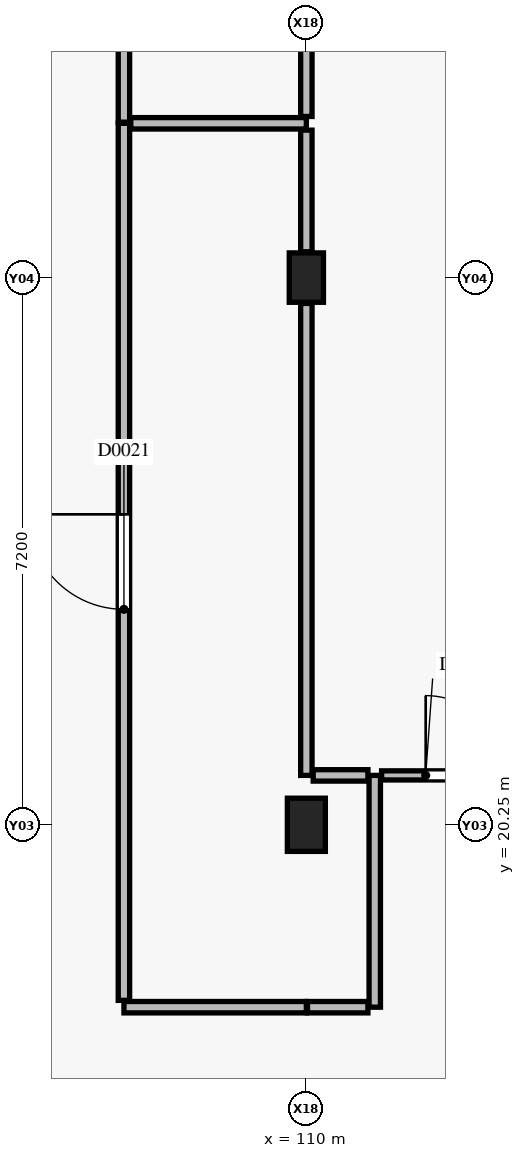
"""IFC4 building model, lengths in metres.
Left out: names, types, materials, properties, quantities, classifications, styles, units other than length and angle.
Written with IfcOpenShell. Run it as: python <this file> out.ifc"""

import sys

from ifc_helpers import new_model, si_unit, direction, frame, frame_2d, origin, origin_2d, place, context, subcontext, project, spatial, rectangle, extrude, element, fill, save


model = new_model("IFC4")
c1 = context("Model", 3, precision=1e-05, world=origin(), true_north=direction((0.0, 1.0)))
c2 = subcontext(c1, "Body", "Model", "MODEL_VIEW")
j1 = project(units=[si_unit("LENGTHUNIT", "METRE"), si_unit("PLANEANGLEUNIT", "RADIAN")], contexts=[c1])
p1 = place(None, origin())
s1 = spatial("IfcSite", under=j1, at=p1, CompositionType="ELEMENT")
p2 = place(p1, origin())
s2 = spatial("IfcBuilding", under=s1, at=p2, CompositionType="ELEMENT")
p3 = place(p2, origin())
s3 = spatial("IfcBuildingStorey", under=s2, at=p3, CompositionType="ELEMENT", Elevation=0.0)
p4 = place(p3, frame((110.0, 20.25, 0.0), z_axis=(0.0, 0.0, 1.0), x_axis=(1.0, 0.0, 0.0)))
e1 = element("IfcColumn", 1, at=p4, inside=s3, PredefinedType="COLUMN", context=c2, shape_type="SweptSolid", body=[
    extrude(rectangle(XDim=0.5, YDim=0.7, at=origin_2d()), origin(), (0.0, 0.0, 1.0), 4.8),
])
p5 = place(p3, frame((110.0, 27.45, 0.0), z_axis=(0.0, 0.0, 1.0), x_axis=(1.0, 0.0, 0.0)))
e2 = element("IfcColumn", 2, at=p5, inside=s3, PredefinedType="COLUMN", context=c2, shape_type="SweptSolid", body=[
    extrude(rectangle(XDim=0.45, YDim=0.65, at=origin_2d()), origin(), (0.0, 0.0, 1.0), 4.8),
])
p6 = place(p3, frame((107.6, 17.85, 0.0), z_axis=(0.0, 0.0, 1.0), x_axis=(1.0, 0.0, 0.0)))
e3 = element("IfcWall", 3, at=p6, inside=s3, PredefinedType="PARTITIONING", context=c2, shape_type="SweptSolid", body=[
    extrude(rectangle(XDim=2.4, YDim=0.15, at=frame_2d((1.2, 0.0))), origin(), (0.0, 0.0, 1.0), 3.955),
])
p7 = place(p3, frame((107.6, 17.94, 0.0), z_axis=(0.0, 0.0, 1.0), x_axis=(0.0, 1.0, 0.0)))
e4 = element("IfcWall", 4, at=p7, inside=s3, PredefinedType="PARTITIONING", context=c2, shape_type="SweptSolid", body=[
    extrude(rectangle(XDim=11.54, YDim=0.15, at=frame_2d((5.77, 0.0))), origin(), (0.0, 0.0, 1.0), 3.955),
])
p8 = place(p7, frame((5.145, 0.0, 0.0)))
e5 = element("IfcOpeningElement", 5, at=p8, cuts=e4, PredefinedType="OPENING", context=c2, shape_type="SweptSolid", body=[
    extrude(rectangle(XDim=1.25, YDim=2.15, at=frame_2d((0.625, 1.075))), frame((0.0, 0.085, 0.0), z_axis=(0.0, -1.0, 0.0), x_axis=(1.0, 0.0, 0.0)), (0.0, 0.0, 1.0), 0.17),
])
p9 = place(p3, frame((110.9, 17.85, 0.0), z_axis=(0.0, 0.0, 1.0), x_axis=(0.0, 1.0, 0.0)))
e6 = element("IfcWall", 6, at=p9, inside=s3, PredefinedType="PARTITIONING", context=c2, shape_type="SweptSolid", body=[
    extrude(rectangle(XDim=3.05, YDim=0.15, at=frame_2d((1.525, 0.0))), origin(), (0.0, 0.0, 1.0), 4.55),
])
p10 = place(p3, frame((110.015, 17.85, 0.0), z_axis=(0.0, 0.0, 1.0), x_axis=(1.0, 0.0, 0.0)))
e7 = element("IfcWall", 7, at=p10, inside=s3, PredefinedType="PARTITIONING", context=c2, shape_type="SweptSolid", body=[
    extrude(rectangle(XDim=0.795, YDim=0.15, at=frame_2d((0.397, 0.0))), origin(), (0.0, 0.0, 1.0), 3.955),
])
p11 = place(p3, frame((107.6, 29.495, 0.0), z_axis=(0.0, 0.0, 1.0), x_axis=(0.0, 1.0, 0.0)))
e8 = element("IfcWall", 8, at=p11, inside=s3, PredefinedType="PARTITIONING", context=c2, shape_type="SweptSolid", body=[
    extrude(rectangle(XDim=9.955, YDim=0.15, at=frame_2d((4.978, 0.0))), origin(), (0.0, 0.0, 1.0), 3.955),
])
p12 = place(p11, frame((4.478, 0.0, 0.0)))
e9 = element("IfcOpeningElement", 9, at=p12, cuts=e8, PredefinedType="OPENING", context=c2, shape_type="SweptSolid", body=[
    extrude(rectangle(XDim=1.0, YDim=2.15, at=frame_2d((0.5, 1.075))), frame((0.0, 0.085, 0.0), z_axis=(0.0, -1.0, 0.0), x_axis=(1.0, 0.0, 0.0)), (0.0, 0.0, 1.0), 0.17),
])
p13 = place(p3, frame((110.99, 20.9, 0.0), z_axis=(0.0, 0.0, 1.0), x_axis=(1.0, 0.0, 0.0)))
e10 = element("IfcWall", 10, at=p13, inside=s3, PredefinedType="PARTITIONING", context=c2, shape_type="SweptSolid", body=[
    extrude(rectangle(XDim=2.21, YDim=0.12, at=frame_2d((1.105, 0.0))), origin(), (0.0, 0.0, 1.0), 4.55),
])
p14 = place(p13, frame((0.58, 0.0, 0.0)))
e11 = element("IfcOpeningElement", 11, at=p14, cuts=e10, PredefinedType="OPENING", context=c2, shape_type="SweptSolid", body=[
    extrude(rectangle(XDim=1.05, YDim=2.15, at=frame_2d((0.525, 1.075))), frame((0.0, 0.07, 0.0), z_axis=(0.0, -1.0, 0.0), x_axis=(1.0, 0.0, 0.0)), (0.0, 0.0, 1.0), 0.14),
])
p15 = place(p3, frame((107.69, 29.48, 0.0), z_axis=(0.0, 0.0, 1.0), x_axis=(1.0, 0.0, 0.0)))
e12 = element("IfcWall", 12, at=p15, inside=s3, PredefinedType="PARTITIONING", context=c2, shape_type="SweptSolid", body=[
    extrude(rectangle(XDim=2.31, YDim=0.15, at=frame_2d((1.155, 0.0))), origin(), (0.0, 0.0, 1.0), 3.985),
])
p16 = place(p3, frame((110.0, 20.9, 0.0), z_axis=(0.0, 0.0, 1.0), x_axis=(0.0, 1.0, 0.0)))
e13 = element("IfcWall", 13, at=p16, inside=s3, PredefinedType="PARTITIONING", context=c2, shape_type="SweptSolid", body=[
    extrude(rectangle(XDim=6.21, YDim=0.15, at=frame_2d((3.105, 0.0))), origin(), (0.0, 0.0, 1.0), 3.955),
])
p17 = place(p3, frame((110.0, 27.79, 0.0), z_axis=(0.0, 0.0, 1.0), x_axis=(0.0, 1.0, 0.0)))
e14 = element("IfcWall", 14, at=p17, inside=s3, PredefinedType="PARTITIONING", context=c2, shape_type="SweptSolid", body=[
    extrude(rectangle(XDim=1.6, YDim=0.15, at=frame_2d((0.8, 0.0))), origin(), (0.0, 0.0, 1.0), 3.985),
])
p18 = place(p3, frame((110.09, 20.9, 0.0), z_axis=(0.0, 0.0, 1.0), x_axis=(1.0, 0.0, 0.0)))
e15 = element("IfcWall", 15, at=p18, inside=s3, PredefinedType="PARTITIONING", context=c2, shape_type="SweptSolid", body=[
    extrude(rectangle(XDim=0.72, YDim=0.15, at=frame_2d((0.36, 0.0))), origin(), (0.0, 0.0, 1.0), 3.955),
])
p19 = place(p3, frame((110.0, 29.57, 0.0), z_axis=(0.0, 0.0, 1.0), x_axis=(0.0, 1.0, 0.0)))
e16 = element("IfcWall", 16, at=p19, inside=s3, PredefinedType="PARTITIONING", context=c2, shape_type="SweptSolid", body=[
    extrude(rectangle(XDim=4.765, YDim=0.15, at=frame_2d((2.382, 0.0))), origin(), (0.0, 0.0, 1.0), 3.985),
])
p20 = place(p8, origin())
e17 = element("IfcDoor", 17, at=p20, inside=s3, OperationType="SINGLE_SWING_RIGHT", PredefinedType="DOOR", context=c2, shape_type="SweptSolid", body=[
    extrude(rectangle(XDim=1.25, YDim=2.15, at=frame_2d((0.625, 1.075))), frame((0.0, 0.025, 0.0), z_axis=(0.0, -1.0, 0.0), x_axis=(1.0, 0.0, 0.0)), (0.0, 0.0, 1.0), 0.05),
])
fill(e5, e17)
p21 = place(p14, origin())
e18 = element("IfcDoor", 18, at=p21, inside=s3, OperationType="SINGLE_SWING_LEFT", PredefinedType="DOOR", context=c2, shape_type="SweptSolid", body=[
    extrude(rectangle(XDim=1.05, YDim=2.15, at=frame_2d((0.525, 1.075))), frame((0.0, 0.025, 0.0), z_axis=(0.0, -1.0, 0.0), x_axis=(1.0, 0.0, 0.0)), (0.0, 0.0, 1.0), 0.05),
])
fill(e11, e18)
save(model, sys.argv[1])
